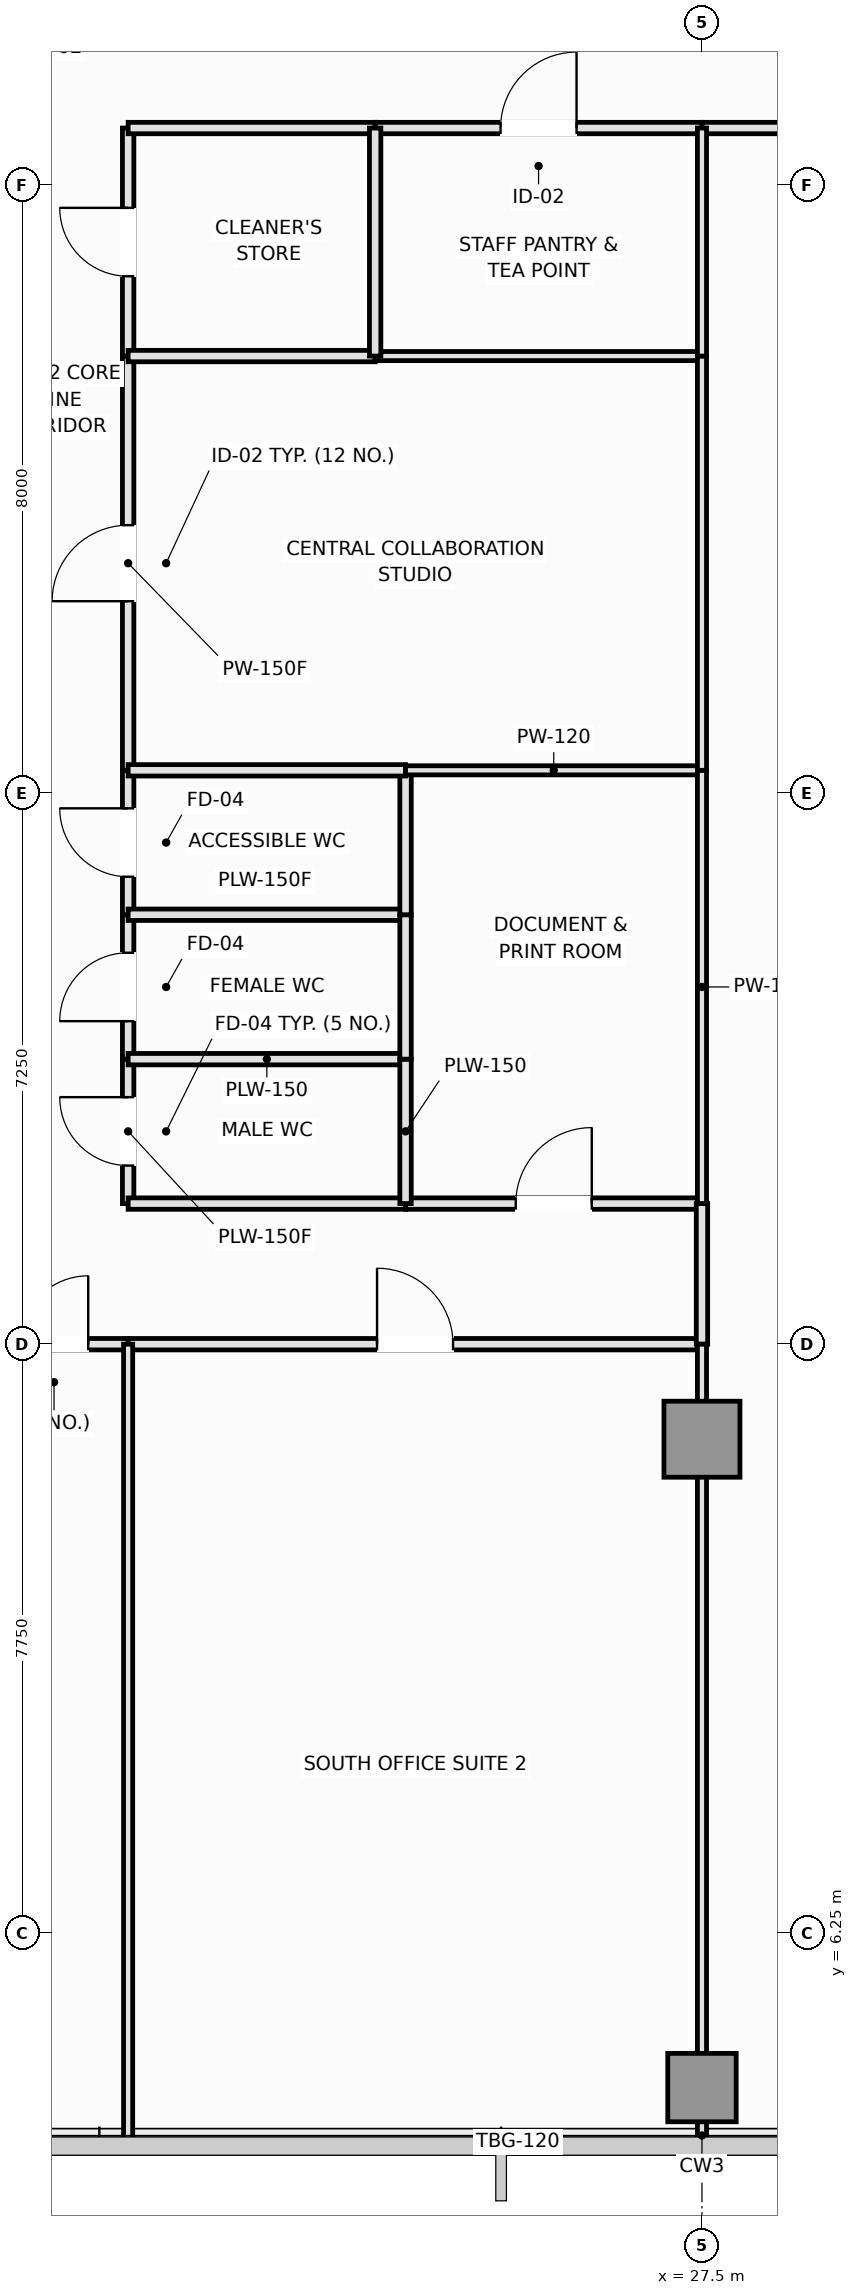
"""IFC4 building model, lengths in metres.
Left out: names, types, materials, properties, quantities, classifications, styles, units other than length and angle.
Written with IfcOpenShell. Run it as: python <this file> out.ifc"""

import sys

from ifc_helpers import new_model, si_unit, direction, frame, frame_2d, origin, origin_2d, place, context, subcontext, project, spatial, rectangle, extrude, element, fill, save


model = new_model("IFC4")
c1 = context("Model", 3, precision=1e-05, world=origin(), true_north=direction((0.0, 1.0)))
c2 = subcontext(c1, "Body", "Model", "MODEL_VIEW")
j1 = project(units=[si_unit("LENGTHUNIT", "METRE"), si_unit("PLANEANGLEUNIT", "RADIAN")], contexts=[c1])
p1 = place(None, origin())
s1 = spatial("IfcSite", under=j1, at=p1, CompositionType="ELEMENT")
p2 = place(p1, origin())
s2 = spatial("IfcBuilding", under=s1, at=p2, CompositionType="ELEMENT")
p3 = place(p2, frame((0.0, 0.0, 148.4)))
s3 = spatial("IfcBuildingStorey", under=s2, at=p3, CompositionType="ELEMENT", Elevation=148.4)
p4 = place(p3, frame((27.5, 12.75, 0.0), z_axis=(0.0, 0.0, 1.0), x_axis=(1.0, 0.0, 0.0)))
e1 = element("IfcColumn", 1, at=p4, inside=s3, PredefinedType="COLUMN", context=c2, shape_type="SweptSolid", body=[
    extrude(rectangle(XDim=1.0, YDim=1.0, at=origin_2d()), origin(), (0.0, 0.0, 1.0), 3.55),
])
p5 = place(p3, frame((27.5, 4.22, 0.0), z_axis=(0.0, 0.0, 1.0), x_axis=(1.0, 0.0, 0.0)))
e2 = element("IfcColumn", 2, at=p5, inside=s3, PredefinedType="COLUMN", context=c2, shape_type="SweptSolid", body=[
    extrude(rectangle(XDim=0.9, YDim=0.9, at=origin_2d()), origin(), (0.0, 0.0, 1.0), 3.55),
])
p6 = place(p3, frame((19.95, 15.85, 0.0), z_axis=(0.0, 0.0, 1.0), x_axis=(0.0, 1.0, 0.0)))
e3 = element("IfcWall", 3, at=p6, inside=s3, PredefinedType="PLUMBINGWALL", context=c2, shape_type="SweptSolid", body=[
    extrude(rectangle(XDim=1.9, YDim=0.15, at=frame_2d((0.95, 0.0))), origin(), (0.0, 0.0, 1.0), 3.37),
])
p7 = place(p6, frame((0.5, 0.0, 0.0)))
e4 = element("IfcOpeningElement", 4, at=p7, cuts=e3, PredefinedType="OPENING", context=c2, shape_type="SweptSolid", body=[
    extrude(rectangle(XDim=0.9, YDim=2.1, at=frame_2d((0.45, 1.05))), frame((0.0, 0.085, 0.0), z_axis=(0.0, -1.0, 0.0), x_axis=(1.0, 0.0, 0.0)), (0.0, 0.0, 1.0), 0.17),
])
p8 = place(p3, frame((19.95, 17.75, 0.0), z_axis=(0.0, 0.0, 1.0), x_axis=(0.0, 1.0, 0.0)))
e5 = element("IfcWall", 5, at=p8, inside=s3, PredefinedType="PLUMBINGWALL", context=c2, shape_type="SweptSolid", body=[
    extrude(rectangle(XDim=1.9, YDim=0.15, at=frame_2d((0.95, 0.0))), origin(), (0.0, 0.0, 1.0), 3.37),
])
p9 = place(p8, frame((0.5, 0.0, 0.0)))
e6 = element("IfcOpeningElement", 6, at=p9, cuts=e5, PredefinedType="OPENING", context=c2, shape_type="SweptSolid", body=[
    extrude(rectangle(XDim=0.9, YDim=2.1, at=frame_2d((0.45, 1.05))), frame((0.0, 0.085, 0.0), z_axis=(0.0, -1.0, 0.0), x_axis=(1.0, 0.0, 0.0)), (0.0, 0.0, 1.0), 0.17),
])
p10 = place(p3, frame((19.95, 19.65, 0.0), z_axis=(0.0, 0.0, 1.0), x_axis=(0.0, 1.0, 0.0)))
e7 = element("IfcWall", 7, at=p10, inside=s3, PredefinedType="PLUMBINGWALL", context=c2, shape_type="SweptSolid", body=[
    extrude(rectangle(XDim=1.9, YDim=0.15, at=frame_2d((0.95, 0.0))), origin(), (0.0, 0.0, 1.0), 3.37),
])
p11 = place(p10, frame((0.5, 0.0, 0.0)))
e8 = element("IfcOpeningElement", 8, at=p11, cuts=e7, PredefinedType="OPENING", context=c2, shape_type="SweptSolid", body=[
    extrude(rectangle(XDim=0.9, YDim=2.1, at=frame_2d((0.45, 1.05))), frame((0.0, 0.085, 0.0), z_axis=(0.0, -1.0, 0.0), x_axis=(1.0, 0.0, 0.0)), (0.0, 0.0, 1.0), 0.17),
])
p12 = place(p3, frame((19.95, 21.55, 0.0), z_axis=(0.0, 0.0, 1.0), x_axis=(0.0, 1.0, 0.0)))
e9 = element("IfcWall", 9, at=p12, inside=s3, PredefinedType="PARTITIONING", context=c2, shape_type="SweptSolid", body=[
    extrude(rectangle(XDim=5.45, YDim=0.15, at=frame_2d((2.725, 0.0))), origin(), (0.0, 0.0, 1.0), 3.37),
])
p13 = place(p12, frame((2.225, 0.0, 0.0)))
e10 = element("IfcOpeningElement", 10, at=p13, cuts=e9, PredefinedType="OPENING", context=c2, shape_type="SweptSolid", body=[
    extrude(rectangle(XDim=1.0, YDim=2.15, at=frame_2d((0.5, 1.075))), frame((0.0, 0.085, 0.0), z_axis=(0.0, -1.0, 0.0), x_axis=(1.0, 0.0, 0.0)), (0.0, 0.0, 1.0), 0.17),
])
p14 = place(p3, frame((19.95, 27.0, 0.0), z_axis=(0.0, 0.0, 1.0), x_axis=(0.0, 1.0, 0.0)))
e11 = element("IfcWall", 11, at=p14, inside=s3, PredefinedType="PLUMBINGWALL", context=c2, shape_type="SweptSolid", body=[
    extrude(rectangle(XDim=3.0, YDim=0.15, at=frame_2d((1.5, 0.0))), origin(), (0.0, 0.0, 1.0), 3.37),
])
p15 = place(p14, frame((1.05, 0.0, 0.0)))
e12 = element("IfcOpeningElement", 12, at=p15, cuts=e11, PredefinedType="OPENING", context=c2, shape_type="SweptSolid", body=[
    extrude(rectangle(XDim=0.9, YDim=2.1, at=frame_2d((0.45, 1.05))), frame((0.0, 0.085, 0.0), z_axis=(0.0, -1.0, 0.0), x_axis=(1.0, 0.0, 0.0)), (0.0, 0.0, 1.0), 0.17),
])
p16 = place(p3, frame((18.0, 14.0, 0.0), z_axis=(0.0, 0.0, 1.0), x_axis=(1.0, 0.0, 0.0)))
e13 = element("IfcWall", 13, at=p16, inside=s3, PredefinedType="PARTITIONING", context=c2, shape_type="SweptSolid", body=[
    extrude(rectangle(XDim=1.95, YDim=0.15, at=frame_2d((0.975, 0.0))), origin(), (0.0, 0.0, 1.0), 3.37),
])
p17 = place(p16, frame((0.525, 0.0, 0.0)))
e14 = element("IfcOpeningElement", 14, at=p17, cuts=e13, PredefinedType="OPENING", context=c2, shape_type="SweptSolid", body=[
    extrude(rectangle(XDim=0.9, YDim=2.1, at=frame_2d((0.45, 1.05))), frame((0.0, 0.085, 0.0), z_axis=(0.0, -1.0, 0.0), x_axis=(1.0, 0.0, 0.0)), (0.0, 0.0, 1.0), 0.17),
])
p18 = place(p3, frame((19.95, 30.0, 0.0), z_axis=(0.0, 0.0, 1.0), x_axis=(1.0, 0.0, 0.0)))
e15 = element("IfcWall", 15, at=p18, inside=s3, PredefinedType="PLUMBINGWALL", context=c2, shape_type="SweptSolid", body=[
    extrude(rectangle(XDim=3.25, YDim=0.15, at=frame_2d((1.625, 0.0))), origin(), (0.0, 0.0, 1.0), 3.37),
])
p19 = place(p3, frame((23.2, 30.0, 0.0), z_axis=(0.0, 0.0, 1.0), x_axis=(1.0, 0.0, 0.0)))
e16 = element("IfcWall", 16, at=p19, inside=s3, PredefinedType="PARTITIONING", context=c2, shape_type="SweptSolid", body=[
    extrude(rectangle(XDim=4.3, YDim=0.15, at=frame_2d((2.15, 0.0))), origin(), (0.0, 0.0, 1.0), 3.37),
])
p20 = place(p19, frame((1.65, 0.0, 0.0)))
e17 = element("IfcOpeningElement", 17, at=p20, cuts=e16, PredefinedType="OPENING", context=c2, shape_type="SweptSolid", body=[
    extrude(rectangle(XDim=1.0, YDim=2.15, at=frame_2d((0.5, 1.075))), frame((0.0, 0.085, 0.0), z_axis=(0.0, -1.0, 0.0), x_axis=(1.0, 0.0, 0.0)), (0.0, 0.0, 1.0), 0.17),
])
p21 = place(p3, frame((27.5, 30.0, 0.0), z_axis=(0.0, 0.0, 1.0), x_axis=(1.0, 0.0, 0.0)))
e18 = element("IfcWall", 18, at=p21, inside=s3, PredefinedType="PARTITIONING", context=c2, shape_type="SweptSolid", body=[
    extrude(rectangle(XDim=7.3, YDim=0.15, at=frame_2d((3.65, 0.0))), origin(), (0.0, 0.0, 1.0), 3.37),
])
p22 = place(p21, frame((3.15, 0.0, 0.0)))
e19 = element("IfcOpeningElement", 19, at=p22, cuts=e18, PredefinedType="OPENING", context=c2, shape_type="SweptSolid", body=[
    extrude(rectangle(XDim=1.0, YDim=2.15, at=frame_2d((0.5, 1.075))), frame((0.0, 0.085, 0.0), z_axis=(0.0, -1.0, 0.0), x_axis=(1.0, 0.0, 0.0)), (0.0, 0.0, 1.0), 0.17),
])
p23 = place(p3, frame((19.95, 15.85, 0.0), z_axis=(0.0, 0.0, 1.0), x_axis=(1.0, 0.0, 0.0)))
e20 = element("IfcWall", 20, at=p23, inside=s3, PredefinedType="PLUMBINGWALL", context=c2, shape_type="SweptSolid", body=[
    extrude(rectangle(XDim=3.65, YDim=0.15, at=frame_2d((1.825, 0.0))), origin(), (0.0, 0.0, 1.0), 3.37),
])
p24 = place(p3, frame((23.6, 15.85, 0.0), z_axis=(0.0, 0.0, 1.0), x_axis=(1.0, 0.0, 0.0)))
e21 = element("IfcWall", 21, at=p24, inside=s3, PredefinedType="PARTITIONING", context=c2, shape_type="SweptSolid", body=[
    extrude(rectangle(XDim=3.9, YDim=0.15, at=frame_2d((1.95, 0.0))), origin(), (0.0, 0.0, 1.0), 3.37),
])
p25 = place(p24, frame((1.45, 0.0, 0.0)))
e22 = element("IfcOpeningElement", 22, at=p25, cuts=e21, PredefinedType="OPENING", context=c2, shape_type="SweptSolid", body=[
    extrude(rectangle(XDim=1.0, YDim=2.15, at=frame_2d((0.5, 1.075))), frame((0.0, 0.085, 0.0), z_axis=(0.0, -1.0, 0.0), x_axis=(1.0, 0.0, 0.0)), (0.0, 0.0, 1.0), 0.17),
])
p26 = place(p3, frame((19.95, 14.0, 0.0), z_axis=(0.0, 0.0, 1.0), x_axis=(1.0, 0.0, 0.0)))
e23 = element("IfcWall", 23, at=p26, inside=s3, PredefinedType="PARTITIONING", context=c2, shape_type="SweptSolid", body=[
    extrude(rectangle(XDim=7.55, YDim=0.15, at=frame_2d((3.775, 0.0))), origin(), (0.0, 0.0, 1.0), 3.37),
])
p27 = place(p26, frame((3.275, 0.0, 0.0)))
e24 = element("IfcOpeningElement", 24, at=p27, cuts=e23, PredefinedType="OPENING", context=c2, shape_type="SweptSolid", body=[
    extrude(rectangle(XDim=1.0, YDim=2.15, at=frame_2d((0.5, 1.075))), frame((0.0, 0.085, 0.0), z_axis=(0.0, -1.0, 0.0), x_axis=(1.0, 0.0, 0.0)), (0.0, 0.0, 1.0), 0.17),
])
p28 = place(p3, frame((27.5, 14.0, 0.0), z_axis=(0.0, 0.0, 1.0), x_axis=(0.0, 1.0, 0.0)))
e25 = element("IfcWall", 25, at=p28, inside=s3, PredefinedType="PARTITIONING", context=c2, shape_type="SweptSolid", body=[
    extrude(rectangle(XDim=1.85, YDim=0.15, at=frame_2d((0.925, 0.0))), origin(), (0.0, 0.0, 1.0), 3.37),
])
p29 = place(p3, frame((19.95, 17.75, 0.0), z_axis=(0.0, 0.0, 1.0), x_axis=(1.0, 0.0, 0.0)))
e26 = element("IfcWall", 26, at=p29, inside=s3, PredefinedType="PLUMBINGWALL", context=c2, shape_type="SweptSolid", body=[
    extrude(rectangle(XDim=3.65, YDim=0.15, at=frame_2d((1.825, 0.0))), origin(), (0.0, 0.0, 1.0), 3.37),
])
p30 = place(p3, frame((23.6, 15.85, 0.0), z_axis=(0.0, 0.0, 1.0), x_axis=(0.0, 1.0, 0.0)))
e27 = element("IfcWall", 27, at=p30, inside=s3, PredefinedType="PLUMBINGWALL", context=c2, shape_type="SweptSolid", body=[
    extrude(rectangle(XDim=1.9, YDim=0.15, at=frame_2d((0.95, 0.0))), origin(), (0.0, 0.0, 1.0), 3.37),
])
p31 = place(p3, frame((19.95, 19.65, 0.0), z_axis=(0.0, 0.0, 1.0), x_axis=(1.0, 0.0, 0.0)))
e28 = element("IfcWall", 28, at=p31, inside=s3, PredefinedType="PLUMBINGWALL", context=c2, shape_type="SweptSolid", body=[
    extrude(rectangle(XDim=3.65, YDim=0.15, at=frame_2d((1.825, 0.0))), origin(), (0.0, 0.0, 1.0), 3.37),
])
p32 = place(p3, frame((23.6, 17.75, 0.0), z_axis=(0.0, 0.0, 1.0), x_axis=(0.0, 1.0, 0.0)))
e29 = element("IfcWall", 29, at=p32, inside=s3, PredefinedType="PLUMBINGWALL", context=c2, shape_type="SweptSolid", body=[
    extrude(rectangle(XDim=1.9, YDim=0.15, at=frame_2d((0.95, 0.0))), origin(), (0.0, 0.0, 1.0), 3.37),
])
p33 = place(p3, frame((23.6, 19.65, 0.0), z_axis=(0.0, 0.0, 1.0), x_axis=(0.0, 1.0, 0.0)))
e30 = element("IfcWall", 30, at=p33, inside=s3, PredefinedType="PLUMBINGWALL", context=c2, shape_type="SweptSolid", body=[
    extrude(rectangle(XDim=1.9, YDim=0.15, at=frame_2d((0.95, 0.0))), origin(), (0.0, 0.0, 1.0), 3.37),
])
p34 = place(p3, frame((19.95, 21.55, 0.0), z_axis=(0.0, 0.0, 1.0), x_axis=(1.0, 0.0, 0.0)))
e31 = element("IfcWall", 31, at=p34, inside=s3, PredefinedType="PLUMBINGWALL", context=c2, shape_type="SweptSolid", body=[
    extrude(rectangle(XDim=3.65, YDim=0.15, at=frame_2d((1.825, 0.0))), origin(), (0.0, 0.0, 1.0), 3.37),
])
p35 = place(p3, frame((23.6, 21.55, 0.0), z_axis=(0.0, 0.0, 1.0), x_axis=(1.0, 0.0, 0.0)))
e32 = element("IfcWall", 32, at=p35, inside=s3, PredefinedType="PARTITIONING", context=c2, shape_type="SweptSolid", body=[
    extrude(rectangle(XDim=3.9, YDim=0.12, at=frame_2d((1.95, 0.0))), origin(), (0.0, 0.0, 1.0), 3.37),
])
p36 = place(p3, frame((27.5, 15.85, 0.0), z_axis=(0.0, 0.0, 1.0), x_axis=(0.0, 1.0, 0.0)))
e33 = element("IfcWall", 33, at=p36, inside=s3, PredefinedType="PARTITIONING", context=c2, shape_type="SweptSolid", body=[
    extrude(rectangle(XDim=5.7, YDim=0.12, at=frame_2d((2.85, 0.0))), origin(), (0.0, 0.0, 1.0), 3.37),
])
p37 = place(p3, frame((19.95, 27.0, 0.0), z_axis=(0.0, 0.0, 1.0), x_axis=(1.0, 0.0, 0.0)))
e34 = element("IfcWall", 34, at=p37, inside=s3, PredefinedType="PLUMBINGWALL", context=c2, shape_type="SweptSolid", body=[
    extrude(rectangle(XDim=3.25, YDim=0.15, at=frame_2d((1.625, 0.0))), origin(), (0.0, 0.0, 1.0), 3.37),
])
p38 = place(p3, frame((23.2, 27.0, 0.0), z_axis=(0.0, 0.0, 1.0), x_axis=(1.0, 0.0, 0.0)))
e35 = element("IfcWall", 35, at=p38, inside=s3, PredefinedType="PARTITIONING", context=c2, shape_type="SweptSolid", body=[
    extrude(rectangle(XDim=4.3, YDim=0.12, at=frame_2d((2.15, 0.0))), origin(), (0.0, 0.0, 1.0), 3.37),
])
p39 = place(p3, frame((27.5, 21.55, 0.0), z_axis=(0.0, 0.0, 1.0), x_axis=(0.0, 1.0, 0.0)))
e36 = element("IfcWall", 36, at=p39, inside=s3, PredefinedType="PARTITIONING", context=c2, shape_type="SweptSolid", body=[
    extrude(rectangle(XDim=5.45, YDim=0.12, at=frame_2d((2.725, 0.0))), origin(), (0.0, 0.0, 1.0), 3.37),
])
p40 = place(p3, frame((23.2, 27.0, 0.0), z_axis=(0.0, 0.0, 1.0), x_axis=(0.0, 1.0, 0.0)))
e37 = element("IfcWall", 37, at=p40, inside=s3, PredefinedType="PLUMBINGWALL", context=c2, shape_type="SweptSolid", body=[
    extrude(rectangle(XDim=3.0, YDim=0.15, at=frame_2d((1.5, 0.0))), origin(), (0.0, 0.0, 1.0), 3.37),
])
p41 = place(p3, frame((27.5, 27.0, 0.0), z_axis=(0.0, 0.0, 1.0), x_axis=(0.0, 1.0, 0.0)))
e38 = element("IfcWall", 38, at=p41, inside=s3, PredefinedType="PARTITIONING", context=c2, shape_type="SweptSolid", body=[
    extrude(rectangle(XDim=3.0, YDim=0.12, at=frame_2d((1.5, 0.0))), origin(), (0.0, 0.0, 1.0), 3.37),
])
p42 = place(p3, frame((19.95, 3.51, 0.0), z_axis=(0.0, 0.0, 1.0), x_axis=(0.0, 1.0, 0.0)))
e39 = element("IfcWall", 39, at=p42, inside=s3, PredefinedType="PARTITIONING", context=c2, shape_type="SweptSolid", body=[
    extrude(rectangle(XDim=10.49, YDim=0.12, at=frame_2d((5.245, 0.0))), origin(), (0.0, 0.0, 1.0), 3.37),
])
p43 = place(p3, frame((27.5, 3.51, 0.0), z_axis=(0.0, 0.0, 1.0), x_axis=(0.0, 1.0, 0.0)))
e40 = element("IfcWall", 40, at=p43, inside=s3, PredefinedType="PARTITIONING", context=c2, shape_type="SweptSolid", body=[
    extrude(rectangle(XDim=10.49, YDim=0.12, at=frame_2d((5.245, 0.0))), origin(), (0.0, 0.0, 1.0), 2.87),
])
p44 = place(p7, origin())
e41 = element("IfcDoor", 41, at=p44, inside=s3, OperationType="SINGLE_SWING_RIGHT", PredefinedType="DOOR", context=c2, shape_type="SweptSolid", body=[
    extrude(rectangle(XDim=0.9, YDim=2.1, at=frame_2d((0.45, 1.05))), frame((0.0, 0.025, 0.0), z_axis=(0.0, -1.0, 0.0), x_axis=(1.0, 0.0, 0.0)), (0.0, 0.0, 1.0), 0.05),
])
fill(e4, e41)
p45 = place(p9, origin())
e42 = element("IfcDoor", 42, at=p45, inside=s3, OperationType="SINGLE_SWING_LEFT", PredefinedType="DOOR", context=c2, shape_type="SweptSolid", body=[
    extrude(rectangle(XDim=0.9, YDim=2.1, at=frame_2d((0.45, 1.05))), frame((0.0, 0.025, 0.0), z_axis=(0.0, -1.0, 0.0), x_axis=(1.0, 0.0, 0.0)), (0.0, 0.0, 1.0), 0.05),
])
fill(e6, e42)
p46 = place(p11, origin())
e43 = element("IfcDoor", 43, at=p46, inside=s3, OperationType="SINGLE_SWING_RIGHT", PredefinedType="DOOR", context=c2, shape_type="SweptSolid", body=[
    extrude(rectangle(XDim=0.9, YDim=2.1, at=frame_2d((0.45, 1.05))), frame((0.0, 0.025, 0.0), z_axis=(0.0, -1.0, 0.0), x_axis=(1.0, 0.0, 0.0)), (0.0, 0.0, 1.0), 0.05),
])
fill(e8, e43)
p47 = place(p13, origin())
e44 = element("IfcDoor", 44, at=p47, inside=s3, OperationType="SINGLE_SWING_LEFT", PredefinedType="DOOR", context=c2, shape_type="SweptSolid", body=[
    extrude(rectangle(XDim=1.0, YDim=2.15, at=frame_2d((0.5, 1.075))), frame((0.0, 0.025, 0.0), z_axis=(0.0, -1.0, 0.0), x_axis=(1.0, 0.0, 0.0)), (0.0, 0.0, 1.0), 0.05),
])
fill(e10, e44)
p48 = place(p15, origin())
e45 = element("IfcDoor", 45, at=p48, inside=s3, OperationType="SINGLE_SWING_RIGHT", PredefinedType="DOOR", context=c2, shape_type="SweptSolid", body=[
    extrude(rectangle(XDim=0.9, YDim=2.1, at=frame_2d((0.45, 1.05))), frame((0.0, 0.025, 0.0), z_axis=(0.0, -1.0, 0.0), x_axis=(1.0, 0.0, 0.0)), (0.0, 0.0, 1.0), 0.05),
])
fill(e12, e45)
p49 = place(p17, origin())
e46 = element("IfcDoor", 46, at=p49, inside=s3, OperationType="SINGLE_SWING_RIGHT", PredefinedType="DOOR", context=c2, shape_type="SweptSolid", body=[
    extrude(rectangle(XDim=0.9, YDim=2.1, at=frame_2d((0.45, 1.05))), frame((0.0, 0.025, 0.0), z_axis=(0.0, -1.0, 0.0), x_axis=(1.0, 0.0, 0.0)), (0.0, 0.0, 1.0), 0.05),
])
fill(e14, e46)
p50 = place(p20, origin())
e47 = element("IfcDoor", 47, at=p50, inside=s3, OperationType="SINGLE_SWING_RIGHT", PredefinedType="DOOR", context=c2, shape_type="SweptSolid", body=[
    extrude(rectangle(XDim=1.0, YDim=2.15, at=frame_2d((0.5, 1.075))), frame((0.0, 0.025, 0.0), z_axis=(0.0, -1.0, 0.0), x_axis=(1.0, 0.0, 0.0)), (0.0, 0.0, 1.0), 0.05),
])
fill(e17, e47)
p51 = place(p25, origin())
e48 = element("IfcDoor", 48, at=p51, inside=s3, OperationType="SINGLE_SWING_RIGHT", PredefinedType="DOOR", context=c2, shape_type="SweptSolid", body=[
    extrude(rectangle(XDim=1.0, YDim=2.15, at=frame_2d((0.5, 1.075))), frame((0.0, 0.025, 0.0), z_axis=(0.0, -1.0, 0.0), x_axis=(1.0, 0.0, 0.0)), (0.0, 0.0, 1.0), 0.05),
])
fill(e22, e48)
p52 = place(p27, origin())
e49 = element("IfcDoor", 49, at=p52, inside=s3, OperationType="SINGLE_SWING_LEFT", PredefinedType="DOOR", context=c2, shape_type="SweptSolid", body=[
    extrude(rectangle(XDim=1.0, YDim=2.15, at=frame_2d((0.5, 1.075))), frame((0.0, 0.025, 0.0), z_axis=(0.0, -1.0, 0.0), x_axis=(1.0, 0.0, 0.0)), (0.0, 0.0, 1.0), 0.05),
])
fill(e24, e49)
save(model, sys.argv[1])
